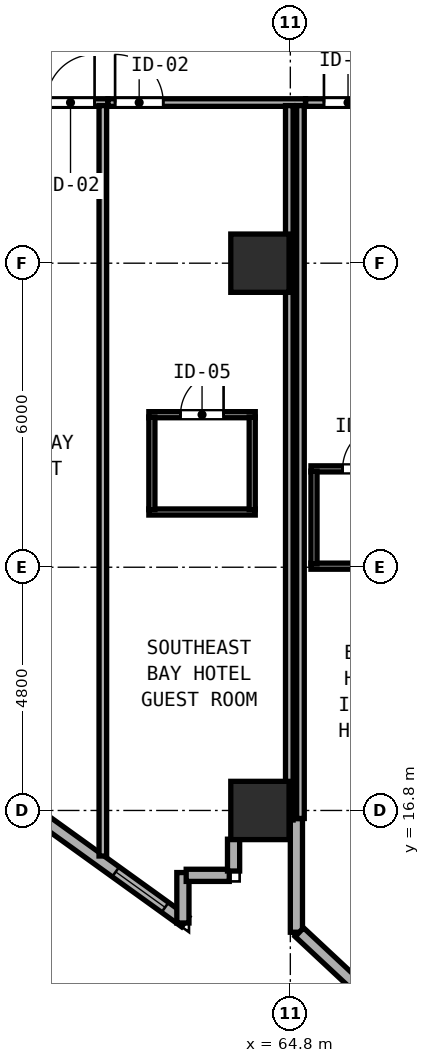
"""IFC4 building model, lengths in metres.
Left out: names, types, materials, properties, quantities, classifications, styles, units other than length and angle.
Written with IfcOpenShell. Run it as: python <this file> out.ifc"""

import sys

from ifc_helpers import new_model, si_unit, direction, frame, frame_2d, origin, origin_2d, place, context, subcontext, project, spatial, rectangle, hollow_rectangle, extrude, element, fill, save


model = new_model("IFC4")
c1 = context("Model", 3, precision=1e-05, world=origin(), true_north=direction((0.0, 1.0)))
c2 = subcontext(c1, "Body", "Model", "MODEL_VIEW")
j1 = project(units=[si_unit("LENGTHUNIT", "METRE"), si_unit("PLANEANGLEUNIT", "RADIAN")], contexts=[c1])
p1 = place(None, origin())
s1 = spatial("IfcSite", under=j1, at=p1, CompositionType="ELEMENT")
p2 = place(p1, origin())
s2 = spatial("IfcBuilding", under=s1, at=p2, CompositionType="ELEMENT")
p3 = place(p2, frame((0.0, 0.0, 85.6)))
s3 = spatial("IfcBuildingStorey", under=s2, at=p3, CompositionType="ELEMENT", Elevation=85.6)
for number, where, z_axis, x_axis in (
    (1, (64.2, 16.8, 0.0), (0.0, 0.0, 1.0), (1.0, 0.0, 0.0)),
    (2, (64.2, 27.6, 0.0), (0.0, 0.0, 1.0), (1.0, 0.0, 0.0)),
):
    element("IfcColumn", number, at=place(p3, frame(where, z_axis=z_axis, x_axis=x_axis)), inside=s3, PredefinedType="COLUMN", context=c2, shape_type="SweptSolid", body=[
        extrude(hollow_rectangle(XDim=1.15, YDim=1.15, WallThickness=0.042, at=origin_2d()), origin(), (0.0, 0.0, 1.0), 3.8),
    ])
p4 = place(p3, frame((53.367, 21.34, 0.0), z_axis=(0.0, 0.0, 1.0), x_axis=(0.811543176492, -0.58429245476, 0.0)))
e3 = element("IfcWall", 3, at=p4, inside=s3, PredefinedType="SOLIDWALL", context=c2, shape_type="SweptSolid", body=[
    extrude(rectangle(XDim=11.531, YDim=0.24, at=frame_2d((5.765, 0.0))), origin(), (0.0, 0.0, 1.0), 3.037),
])
p5 = place(p4, frame((1.6, 0.0, 0.85)))
e4 = element("IfcOpeningElement", 4, at=p5, cuts=e3, PredefinedType="OPENING", context=c2, shape_type="SweptSolid", body=[
    extrude(rectangle(XDim=1.2, YDim=1.85, at=frame_2d((0.6, 0.925))), frame((0.0, 0.13, 0.0), z_axis=(0.0, -1.0, 0.0), x_axis=(1.0, 0.0, 0.0)), (0.0, 0.0, 1.0), 0.26),
])
p6 = place(p4, frame((7.0, 0.0, 0.85)))
e5 = element("IfcOpeningElement", 5, at=p6, cuts=e3, PredefinedType="OPENING", context=c2, shape_type="SweptSolid", body=[
    extrude(rectangle(XDim=1.2, YDim=1.85, at=frame_2d((0.6, 0.925))), frame((0.0, 0.13, 0.0), z_axis=(0.0, -1.0, 0.0), x_axis=(1.0, 0.0, 0.0)), (0.0, 0.0, 1.0), 0.26),
])
p7 = place(p4, frame((9.842, 0.0, 0.85)))
e6 = element("IfcOpeningElement", 6, at=p7, cuts=e3, PredefinedType="OPENING", context=c2, shape_type="SweptSolid", body=[
    extrude(rectangle(XDim=1.2, YDim=1.85, at=frame_2d((0.6, 0.925))), frame((0.0, 0.13, 0.0), z_axis=(0.0, -1.0, 0.0), x_axis=(1.0, 0.0, 0.0)), (0.0, 0.0, 1.0), 0.26),
])
p8 = place(p3, frame((62.68, 14.579, 0.0), z_axis=(0.0, 0.0, 1.0), x_axis=(0.0, 1.0, 0.0)))
e7 = element("IfcWall", 7, at=p8, inside=s3, PredefinedType="SOLIDWALL", context=c2, shape_type="SweptSolid", body=[
    extrude(rectangle(XDim=0.996, YDim=0.24, at=frame_2d((0.498, 0.0))), origin(), (0.0, 0.0, 1.0), 3.54),
])
p9 = place(p3, frame((62.745, 15.52, 0.0), z_axis=(0.0, 0.0, 1.0), x_axis=(1.0, 0.0, 0.0)))
e8 = element("IfcWall", 8, at=p9, inside=s3, PredefinedType="SOLIDWALL", context=c2, shape_type="SweptSolid", body=[
    extrude(rectangle(XDim=0.85, YDim=0.24, at=frame_2d((0.425, 0.0))), origin(), (0.0, 0.0, 1.0), 3.54),
])
p10 = place(p3, frame((63.68, 15.605, 0.0), z_axis=(0.0, 0.0, 1.0), x_axis=(0.0, 1.0, 0.0)))
e9 = element("IfcWall", 9, at=p10, inside=s3, PredefinedType="SOLIDWALL", context=c2, shape_type="SweptSolid", body=[
    extrude(rectangle(XDim=0.628, YDim=0.24, at=frame_2d((0.314, 0.0))), origin(), (0.0, 0.0, 1.0), 3.54),
])
p11 = place(p3, frame((64.92, 16.64, 0.0), z_axis=(0.0, 0.0, 1.0), x_axis=(0.0, -1.0, 0.0)))
e10 = element("IfcWall", 10, at=p11, inside=s3, PredefinedType="SOLIDWALL", context=c2, shape_type="SweptSolid", body=[
    extrude(rectangle(XDim=2.243, YDim=0.24, at=frame_2d((1.121, 0.0))), origin(), (0.0, 0.0, 1.0), 3.54),
])
p12 = place(p3, frame((64.979, 14.397, 0.0), z_axis=(0.0, 0.0, 1.0), x_axis=(0.731053894258, -0.682319722484, 0.0)))
e11 = element("IfcWall", 11, at=p12, inside=s3, PredefinedType="SOLIDWALL", context=c2, shape_type="SweptSolid", body=[
    extrude(rectangle(XDim=11.818, YDim=0.24, at=frame_2d((5.909, 0.0))), origin(), (0.0, 0.0, 1.0), 3.54),
])
p13 = place(p12, frame((1.6, 0.0, 0.85)))
e12 = element("IfcOpeningElement", 12, at=p13, cuts=e11, PredefinedType="OPENING", context=c2, shape_type="SweptSolid", body=[
    extrude(rectangle(XDim=1.2, YDim=1.85, at=frame_2d((0.6, 0.925))), frame((0.0, 0.13, 0.0), z_axis=(0.0, -1.0, 0.0), x_axis=(1.0, 0.0, 0.0)), (0.0, 0.0, 1.0), 0.26),
])
p14 = place(p12, frame((7.0, 0.0, 0.85)))
e13 = element("IfcOpeningElement", 13, at=p14, cuts=e11, PredefinedType="OPENING", context=c2, shape_type="SweptSolid", body=[
    extrude(rectangle(XDim=1.2, YDim=1.85, at=frame_2d((0.6, 0.925))), frame((0.0, 0.13, 0.0), z_axis=(0.0, -1.0, 0.0), x_axis=(1.0, 0.0, 0.0)), (0.0, 0.0, 1.0), 0.26),
])
p15 = place(p3, frame((73.388, 31.079, 0.0), z_axis=(0.0, 0.0, 1.0), x_axis=(-0.963197271032, 0.268795493036, 0.0)))
e14 = element("IfcWall", 14, at=p15, inside=s3, PredefinedType="SOLIDWALL", context=c2, shape_type="SweptSolid", body=[
    extrude(rectangle(XDim=9.095, YDim=0.24, at=frame_2d((4.548, 0.0))), origin(), (0.0, 0.0, 1.0), 3.54),
])
p16 = place(p15, frame((1.6, 0.0, 0.85)))
e15 = element("IfcOpeningElement", 15, at=p16, cuts=e14, PredefinedType="OPENING", context=c2, shape_type="SweptSolid", body=[
    extrude(rectangle(XDim=1.2, YDim=1.85, at=frame_2d((0.6, 0.925))), frame((0.0, 0.13, 0.0), z_axis=(0.0, -1.0, 0.0), x_axis=(1.0, 0.0, 0.0)), (0.0, 0.0, 1.0), 0.26),
])
p17 = place(p15, frame((7.0, 0.0, 0.85)))
e16 = element("IfcOpeningElement", 16, at=p17, cuts=e14, PredefinedType="OPENING", context=c2, shape_type="SweptSolid", body=[
    extrude(rectangle(XDim=1.2, YDim=1.85, at=frame_2d((0.6, 0.925))), frame((0.0, 0.13, 0.0), z_axis=(0.0, -1.0, 0.0), x_axis=(1.0, 0.0, 0.0)), (0.0, 0.0, 1.0), 0.26),
])
p18 = place(p3, frame((57.052, 30.77, 0.0), z_axis=(0.0, 0.0, 1.0), x_axis=(1.0, 0.0, 0.0)))
e17 = element("IfcWall", 17, at=p18, inside=s3, PredefinedType="PARTITIONING", context=c2, shape_type="SweptSolid", body=[
    extrude(rectangle(XDim=4.148, YDim=0.15, at=frame_2d((2.074, 0.0))), origin(), (0.0, 0.0, 1.0), 3.54),
])
p19 = place(p18, frame((3.885, 0.0, 0.0), z_axis=(0.0, 0.0, 1.0), x_axis=(-1.0, 0.0, 0.0)))
e18 = element("IfcOpeningElement", 18, at=p19, cuts=e17, PredefinedType="OPENING", context=c2, shape_type="SweptSolid", body=[
    extrude(rectangle(XDim=0.95, YDim=2.15, at=frame_2d((0.475, 1.075))), frame((0.0, 0.085, 0.0), z_axis=(0.0, -1.0, 0.0), x_axis=(1.0, 0.0, 0.0)), (0.0, 0.0, 1.0), 0.17),
])
p20 = place(p3, frame((61.1, 15.901, 0.0), z_axis=(0.0, 0.0, 1.0), x_axis=(0.0, 1.0, 0.0)))
e19 = element("IfcWall", 19, at=p20, inside=s3, PredefinedType="PARTITIONING", context=c2, shape_type="SweptSolid", body=[
    extrude(rectangle(XDim=14.809, YDim=0.15, at=frame_2d((7.404, 0.0))), origin(), (0.0, 0.0, 1.0), 3.54),
])
p21 = place(p3, frame((61.202, 30.77, 0.0), z_axis=(0.0, 0.0, 1.0), x_axis=(1.0, 0.0, 0.0)))
e20 = element("IfcWall", 20, at=p21, inside=s3, PredefinedType="PARTITIONING", context=c2, shape_type="SweptSolid", body=[
    extrude(rectangle(XDim=3.898, YDim=0.15, at=frame_2d((1.949, 0.0))), origin(), (0.0, 0.0, 1.0), 3.54),
])
p22 = place(p21, frame((1.09, 0.0, 0.0), z_axis=(0.0, 0.0, 1.0), x_axis=(-1.0, 0.0, 0.0)))
e21 = element("IfcOpeningElement", 21, at=p22, cuts=e20, PredefinedType="OPENING", context=c2, shape_type="SweptSolid", body=[
    extrude(rectangle(XDim=0.95, YDim=2.15, at=frame_2d((0.475, 1.075))), frame((0.0, 0.085, 0.0), z_axis=(0.0, -1.0, 0.0), x_axis=(1.0, 0.0, 0.0)), (0.0, 0.0, 1.0), 0.17),
])
p23 = place(p3, frame((65.0, 16.642, 0.0), z_axis=(0.0, 0.0, 1.0), x_axis=(0.0, 1.0, 0.0)))
e22 = element("IfcWall", 22, at=p23, inside=s3, PredefinedType="PARTITIONING", context=c2, shape_type="SweptSolid", body=[
    extrude(rectangle(XDim=14.068, YDim=0.15, at=frame_2d((7.034, 0.0))), origin(), (0.0, 0.0, 1.0), 3.54),
])
p24 = place(p3, frame((62.008, 24.61, 0.0), z_axis=(0.0, 0.0, 1.0), x_axis=(1.0, 0.0, 0.0)))
e23 = element("IfcWall", 23, at=p24, inside=s3, PredefinedType="PARTITIONING", context=c2, shape_type="SweptSolid", body=[
    extrude(rectangle(XDim=2.1, YDim=0.12, at=frame_2d((1.05, 0.0))), origin(), (0.0, 0.0, 1.0), 3.54),
])
p25 = place(p24, frame((1.475, 0.0, 0.0), z_axis=(0.0, 0.0, 1.0), x_axis=(-1.0, 0.0, 0.0)))
e24 = element("IfcOpeningElement", 24, at=p25, cuts=e23, PredefinedType="OPENING", context=c2, shape_type="SweptSolid", body=[
    extrude(rectangle(XDim=0.85, YDim=2.1, at=frame_2d((0.425, 1.05))), frame((0.0, 0.07, 0.0), z_axis=(0.0, -1.0, 0.0), x_axis=(1.0, 0.0, 0.0)), (0.0, 0.0, 1.0), 0.14),
])
p26 = place(p3, frame((62.008, 22.69, 0.0), z_axis=(0.0, 0.0, 1.0), x_axis=(1.0, 0.0, 0.0)))
e25 = element("IfcWall", 25, at=p26, inside=s3, PredefinedType="PARTITIONING", context=c2, shape_type="SweptSolid", body=[
    extrude(rectangle(XDim=2.1, YDim=0.12, at=frame_2d((1.05, 0.0))), origin(), (0.0, 0.0, 1.0), 3.54),
])
p27 = place(p3, frame((62.068, 22.735, 0.0), z_axis=(0.0, 0.0, 1.0), x_axis=(0.0, 1.0, 0.0)))
e26 = element("IfcWall", 26, at=p27, inside=s3, PredefinedType="PARTITIONING", context=c2, shape_type="SweptSolid", body=[
    extrude(rectangle(XDim=1.83, YDim=0.12, at=frame_2d((0.915, 0.0))), origin(), (0.0, 0.0, 1.0), 3.54),
])
p28 = place(p3, frame((64.048, 22.735, 0.0), z_axis=(0.0, 0.0, 1.0), x_axis=(0.0, 1.0, 0.0)))
e27 = element("IfcWall", 27, at=p28, inside=s3, PredefinedType="PARTITIONING", context=c2, shape_type="SweptSolid", body=[
    extrude(rectangle(XDim=1.83, YDim=0.12, at=frame_2d((0.915, 0.0))), origin(), (0.0, 0.0, 1.0), 3.037),
])
p29 = place(p3, frame((65.102, 30.77, 0.0), z_axis=(0.0, 0.0, 1.0), x_axis=(1.0, 0.0, 0.0)))
e28 = element("IfcWall", 28, at=p29, inside=s3, PredefinedType="PARTITIONING", context=c2, shape_type="SweptSolid", body=[
    extrude(rectangle(XDim=2.498, YDim=0.15, at=frame_2d((1.249, 0.0))), origin(), (0.0, 0.0, 1.0), 3.54),
])
p30 = place(p29, frame((1.312, 0.0, 0.0), z_axis=(0.0, 0.0, 1.0), x_axis=(-1.0, 0.0, 0.0)))
e29 = element("IfcOpeningElement", 29, at=p30, cuts=e28, PredefinedType="OPENING", context=c2, shape_type="SweptSolid", body=[
    extrude(rectangle(XDim=0.95, YDim=2.15, at=frame_2d((0.475, 1.075))), frame((0.0, 0.085, 0.0), z_axis=(0.0, -1.0, 0.0), x_axis=(1.0, 0.0, 0.0)), (0.0, 0.0, 1.0), 0.17),
])
p31 = place(p3, frame((64.78, 16.612, 0.0), z_axis=(0.0, 0.0, 1.0), x_axis=(0.0, 1.0, 0.0)))
e30 = element("IfcWall", 30, at=p31, inside=s3, PredefinedType="PARTITIONING", context=c2, shape_type="SweptSolid", body=[
    extrude(rectangle(XDim=14.098, YDim=0.15, at=frame_2d((7.049, 0.0))), origin(), (0.0, 0.0, 1.0), 3.54),
])
p32 = place(p3, frame((65.207, 23.541, 0.0), z_axis=(0.0, 0.0, 1.0), x_axis=(1.0, 0.0, 0.0)))
e31 = element("IfcWall", 31, at=p32, inside=s3, PredefinedType="PARTITIONING", context=c2, shape_type="SweptSolid", body=[
    extrude(rectangle(XDim=2.1, YDim=0.12, at=frame_2d((1.05, 0.0))), origin(), (0.0, 0.0, 1.0), 3.54),
])
p33 = place(p32, frame((1.475, 0.0, 0.0), z_axis=(0.0, 0.0, 1.0), x_axis=(-1.0, 0.0, 0.0)))
e32 = element("IfcOpeningElement", 32, at=p33, cuts=e31, PredefinedType="OPENING", context=c2, shape_type="SweptSolid", body=[
    extrude(rectangle(XDim=0.85, YDim=2.1, at=frame_2d((0.425, 1.05))), frame((0.0, 0.07, 0.0), z_axis=(0.0, -1.0, 0.0), x_axis=(1.0, 0.0, 0.0)), (0.0, 0.0, 1.0), 0.14),
])
p34 = place(p3, frame((65.207, 21.621, 0.0), z_axis=(0.0, 0.0, 1.0), x_axis=(1.0, 0.0, 0.0)))
e33 = element("IfcWall", 33, at=p34, inside=s3, PredefinedType="PARTITIONING", context=c2, shape_type="SweptSolid", body=[
    extrude(rectangle(XDim=2.1, YDim=0.12, at=frame_2d((1.05, 0.0))), origin(), (0.0, 0.0, 1.0), 3.54),
])
p35 = place(p3, frame((65.267, 21.666, 0.0), z_axis=(0.0, 0.0, 1.0), x_axis=(0.0, 1.0, 0.0)))
e34 = element("IfcWall", 34, at=p35, inside=s3, PredefinedType="PARTITIONING", context=c2, shape_type="SweptSolid", body=[
    extrude(rectangle(XDim=1.83, YDim=0.12, at=frame_2d((0.915, 0.0))), origin(), (0.0, 0.0, 1.0), 3.54),
])
p36 = place(p19, origin())
e35 = element("IfcDoor", 35, at=p36, inside=s3, OperationType="SINGLE_SWING_LEFT", PredefinedType="DOOR", context=c2, shape_type="SweptSolid", body=[
    extrude(rectangle(XDim=0.95, YDim=2.15, at=frame_2d((0.475, 1.075))), frame((0.0, 0.025, 0.0), z_axis=(0.0, -1.0, 0.0), x_axis=(1.0, 0.0, 0.0)), (0.0, 0.0, 1.0), 0.05),
])
fill(e18, e35)
p37 = place(p22, origin())
e36 = element("IfcDoor", 36, at=p37, inside=s3, OperationType="SINGLE_SWING_RIGHT", PredefinedType="DOOR", context=c2, shape_type="SweptSolid", body=[
    extrude(rectangle(XDim=0.95, YDim=2.15, at=frame_2d((0.475, 1.075))), frame((0.0, 0.025, 0.0), z_axis=(0.0, -1.0, 0.0), x_axis=(1.0, 0.0, 0.0)), (0.0, 0.0, 1.0), 0.05),
])
fill(e21, e36)
p38 = place(p25, origin())
e37 = element("IfcDoor", 37, at=p38, inside=s3, OperationType="SINGLE_SWING_LEFT", PredefinedType="DOOR", context=c2, shape_type="SweptSolid", body=[
    extrude(rectangle(XDim=0.85, YDim=2.1, at=frame_2d((0.425, 1.05))), frame((0.0, 0.025, 0.0), z_axis=(0.0, -1.0, 0.0), x_axis=(1.0, 0.0, 0.0)), (0.0, 0.0, 1.0), 0.05),
])
fill(e24, e37)
p39 = place(p30, origin())
e38 = element("IfcDoor", 38, at=p39, inside=s3, OperationType="SINGLE_SWING_RIGHT", PredefinedType="DOOR", context=c2, shape_type="SweptSolid", body=[
    extrude(rectangle(XDim=0.95, YDim=2.15, at=frame_2d((0.475, 1.075))), frame((0.0, 0.025, 0.0), z_axis=(0.0, -1.0, 0.0), x_axis=(1.0, 0.0, 0.0)), (0.0, 0.0, 1.0), 0.05),
])
fill(e29, e38)
p40 = place(p33, origin())
e39 = element("IfcDoor", 39, at=p40, inside=s3, OperationType="SINGLE_SWING_LEFT", PredefinedType="DOOR", context=c2, shape_type="SweptSolid", body=[
    extrude(rectangle(XDim=0.85, YDim=2.1, at=frame_2d((0.425, 1.05))), frame((0.0, 0.025, 0.0), z_axis=(0.0, -1.0, 0.0), x_axis=(1.0, 0.0, 0.0)), (0.0, 0.0, 1.0), 0.05),
])
fill(e32, e39)
p41 = place(p7, origin())
e40 = element("IfcWindow", 40, at=p41, inside=s3, PartitioningType="SINGLE_PANEL", PredefinedType="WINDOW", context=c2, shape_type="SweptSolid", body=[
    extrude(rectangle(XDim=1.2, YDim=1.85, at=frame_2d((0.6, 0.925))), frame((0.0, 0.03, 0.0), z_axis=(0.0, -1.0, 0.0), x_axis=(1.0, 0.0, 0.0)), (0.0, 0.0, 1.0), 0.06),
])
fill(e6, e40)
save(model, sys.argv[1])
